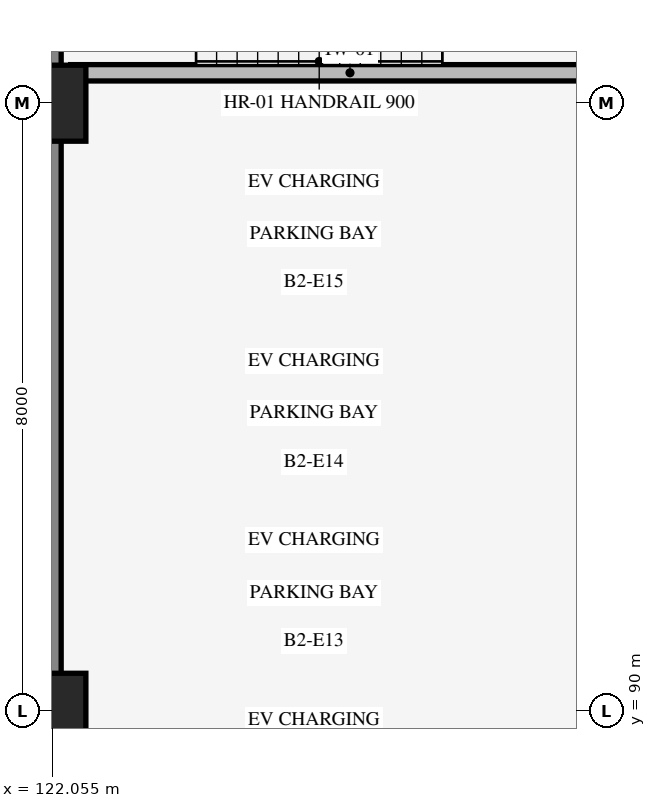
"""IFC4 building model, lengths in metres.
Left out: names, types, materials, properties, quantities, classifications, styles, units other than length and angle.
Written with IfcOpenShell. Run it as: python <this file> out.ifc"""

import sys

from ifc_helpers import new_model, si_unit, direction, frame, frame_2d, origin, origin_2d, place, context, subcontext, project, spatial, rectangle, extrude, element, save


model = new_model("IFC4")
c1 = context("Model", 3, precision=1e-05, world=origin(), true_north=direction((0.0, 1.0)))
c2 = subcontext(c1, "Body", "Model", "MODEL_VIEW")
j1 = project(units=[si_unit("LENGTHUNIT", "METRE"), si_unit("PLANEANGLEUNIT", "RADIAN")], contexts=[c1])
p1 = place(None, origin())
s1 = spatial("IfcSite", under=j1, at=p1, CompositionType="ELEMENT")
p2 = place(p1, origin())
s2 = spatial("IfcBuilding", under=s1, at=p2, CompositionType="ELEMENT")
p3 = place(p2, frame((0.0, 0.0, -9.0)))
s3 = spatial("IfcBuildingStorey", under=s2, at=p3, CompositionType="ELEMENT", Elevation=-9.0)
p4 = place(p3, frame((122.0, 106.0, 0.0), z_axis=(0.0, 0.0, 1.0), x_axis=(0.0, -1.0, 0.0)))
e1 = element("IfcWall", 1, at=p4, inside=s3, PredefinedType="SOLIDWALL", context=c2, shape_type="SweptSolid", body=[
    extrude(rectangle(XDim=80.0, YDim=0.35, at=frame_2d((40.0, 0.0))), origin(), (0.0, 0.0, 1.0), 4.22),
])
for number, where, z_axis, x_axis in (
    (2, (122.0, 90.0, 0.0), (0.0, 0.0, 1.0), (1.0, 0.0, 0.0)),
    (3, (122.0, 98.0, 0.0), (0.0, 0.0, 1.0), (1.0, 0.0, 0.0)),
):
    element("IfcColumn", number, at=place(p3, frame(where, z_axis=z_axis, x_axis=x_axis)), inside=s3, PredefinedType="COLUMN", context=c2, shape_type="SweptSolid", body=[
        extrude(rectangle(XDim=1.0, YDim=1.0, at=origin_2d()), origin(), (0.0, 0.0, 1.0), 4.5),
    ])
p5 = place(p3, frame((129.75, 98.4, 0.0), z_axis=(0.0, 0.0, 1.0), x_axis=(-1.0, 0.0, 0.0)))
e4 = element("IfcWall", 4, at=p5, inside=s3, PredefinedType="STANDARD", context=c2, shape_type="SweptSolid", body=[
    extrude(rectangle(XDim=7.45, YDim=0.215, at=frame_2d((3.725, 0.0))), origin(), (0.0, 0.0, 1.0), 3.35),
])
save(model, sys.argv[1])
